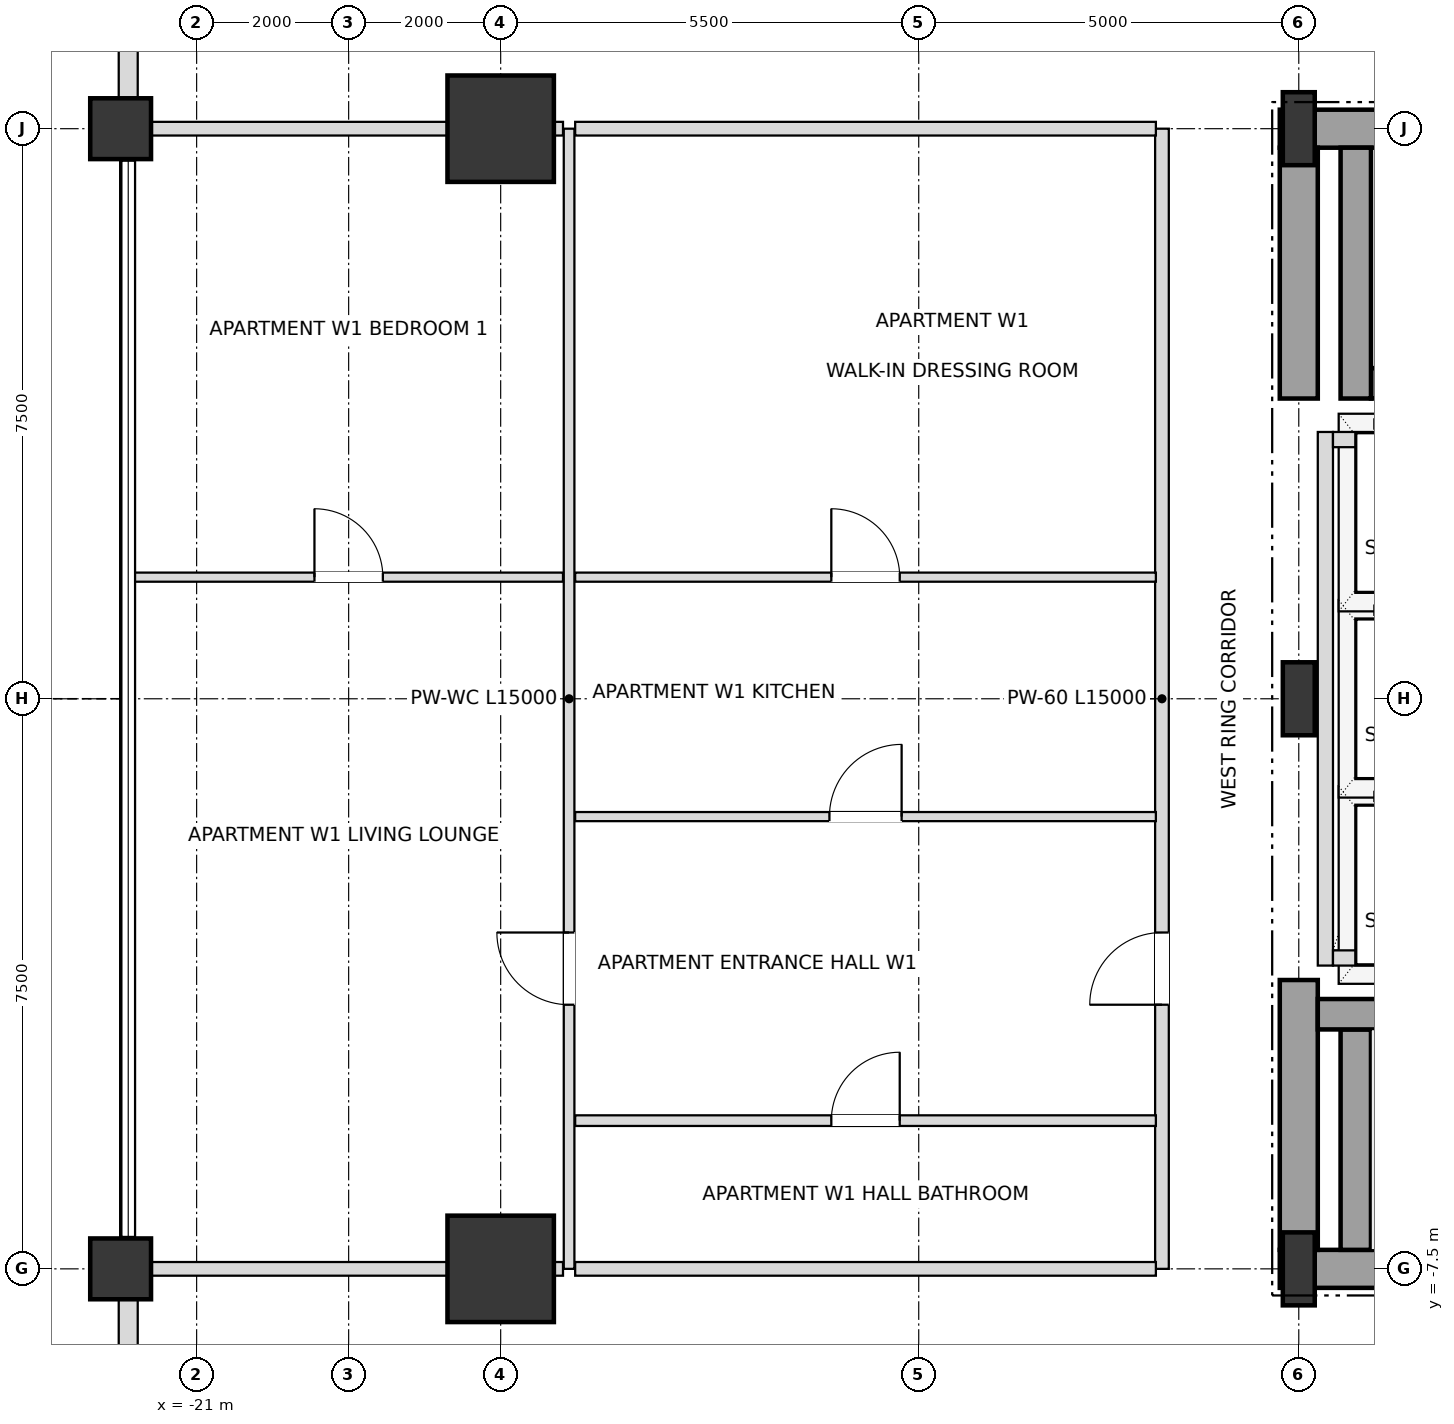
"""IFC4 building model, lengths in metres.
Left out: names, types, materials, properties, quantities, classifications, styles, units other than length and angle.
Written with IfcOpenShell. Run it as: python <this file> out.ifc"""

import sys

from ifc_helpers import new_model, si_unit, direction, frame, frame_2d, origin, origin_2d, place, context, subcontext, project, spatial, rectangle, i_section, extrude, element, fill, save


model = new_model("IFC4")
c1 = context("Model", 3, precision=1e-05, world=origin(), true_north=direction((0.0, 1.0)))
c2 = subcontext(c1, "Body", "Model", "MODEL_VIEW")
j1 = project(units=[si_unit("LENGTHUNIT", "METRE"), si_unit("PLANEANGLEUNIT", "RADIAN")], contexts=[c1])
p1 = place(None, origin())
s1 = spatial("IfcSite", under=j1, at=p1, CompositionType="ELEMENT")
p2 = place(p1, origin())
s2 = spatial("IfcBuilding", under=s1, at=p2, CompositionType="ELEMENT")
p3 = place(p2, frame((0.0, 0.0, 72.0)))
s3 = spatial("IfcBuildingStorey", under=s2, at=p3, CompositionType="ELEMENT", Elevation=72.0)
for number, where, z_axis, x_axis in (
    (1, (-6.5, -7.5, 0.0), (0.0, 0.0, 1.0), (1.0, 0.0, 0.0)),
    (2, (-6.5, 0.0, 0.0), (0.0, 0.0, 1.0), (1.0, 0.0, 0.0)),
    (3, (-6.5, 7.5, 0.0), (0.0, 0.0, 1.0), (1.0, 0.0, 0.0)),
):
    element("IfcColumn", number, at=place(p3, frame(where, z_axis=z_axis, x_axis=x_axis)), inside=s3, PredefinedType="COLUMN", context=c2, shape_type="SweptSolid", body=[
        extrude(i_section(OverallWidth=0.42, OverallDepth=0.96, WebThickness=0.022, FlangeThickness=0.034, at=origin_2d()), origin(), (0.0, 0.0, 1.0), 3.6),
    ])
for number, where, z_axis, x_axis in (
    (4, (-17.0, 7.5, 0.0), (0.0, 0.0, 1.0), (1.0, 0.0, 0.0)),
    (5, (-17.0, -7.5, 0.0), (0.0, 0.0, 1.0), (1.0, 0.0, 0.0)),
):
    element("IfcColumn", number, at=place(p3, frame(where, z_axis=z_axis, x_axis=x_axis)), inside=s3, PredefinedType="USERDEFINED", context=c2, shape_type="SweptSolid", body=[
        extrude(rectangle(XDim=1.4, YDim=1.4, at=origin_2d()), origin(), (0.0, 0.0, 1.0), 3.6),
    ])
for number, where, z_axis, x_axis in (
    (6, (-22.0, -7.5, 0.0), (0.0, 0.0, 1.0), (1.0, 0.0, 0.0)),
    (7, (-22.0, 7.5, 0.0), (0.0, 0.0, 1.0), (1.0, 0.0, 0.0)),
):
    element("IfcColumn", number, at=place(p3, frame(where, z_axis=z_axis, x_axis=x_axis)), inside=s3, PredefinedType="COLUMN", context=c2, shape_type="SweptSolid", body=[
        extrude(rectangle(XDim=0.8, YDim=0.8, at=origin_2d()), origin(), (0.0, 0.0, 1.0), 3.6),
    ])
p4 = place(p3, frame((-21.9, 12.605, 0.0), z_axis=(0.0, 0.0, 1.0), x_axis=(0.0, -1.0, 0.0)))
e8 = element("IfcWall", 8, at=p4, inside=s3, PredefinedType="SOLIDWALL", context=c2, shape_type="SweptSolid", body=[
    extrude(rectangle(XDim=4.71, YDim=0.25, at=frame_2d((2.355, 0.0))), origin(), (0.0, 0.0, 1.0), 2.736),
])
p5 = place(p4, frame((1.455, 0.0, 0.72)))
e9 = element("IfcOpeningElement", 9, at=p5, cuts=e8, PredefinedType="OPENING", context=c2, shape_type="SweptSolid", body=[
    extrude(rectangle(XDim=1.8, YDim=1.68, at=frame_2d((0.9, 0.84))), frame((0.0, 0.135, 0.0), z_axis=(0.0, -1.0, 0.0), x_axis=(1.0, 0.0, 0.0)), (0.0, 0.0, 1.0), 0.27),
])
p6 = place(p3, frame((-21.9, -7.895, 0.0), z_axis=(0.0, 0.0, 1.0), x_axis=(0.0, -1.0, 0.0)))
e10 = element("IfcWall", 10, at=p6, inside=s3, PredefinedType="SOLIDWALL", context=c2, shape_type="SweptSolid", body=[
    extrude(rectangle(XDim=4.71, YDim=0.25, at=frame_2d((2.355, 0.0))), origin(), (0.0, 0.0, 1.0), 2.736),
])
p7 = place(p6, frame((1.455, 0.0, 0.72)))
e11 = element("IfcOpeningElement", 11, at=p7, cuts=e10, PredefinedType="OPENING", context=c2, shape_type="SweptSolid", body=[
    extrude(rectangle(XDim=1.8, YDim=1.68, at=frame_2d((0.9, 0.84))), frame((0.0, 0.135, 0.0), z_axis=(0.0, -1.0, 0.0), x_axis=(1.0, 0.0, 0.0)), (0.0, 0.0, 1.0), 0.27),
])
p8 = place(p3, frame((-6.75, -7.5, 0.0), z_axis=(0.0, 0.0, 1.0), x_axis=(1.0, 0.0, 0.0)))
e12 = element("IfcWall", 12, at=p8, inside=s3, PredefinedType="SHEAR", context=c2, shape_type="SweptSolid", body=[
    extrude(rectangle(XDim=6.75, YDim=0.5, at=frame_2d((3.375, 0.0))), origin(), (0.0, 0.0, 1.0), 3.38),
])
p9 = place(p3, frame((-6.75, 7.5, 0.0), z_axis=(0.0, 0.0, 1.0), x_axis=(1.0, 0.0, 0.0)))
e13 = element("IfcWall", 13, at=p9, inside=s3, PredefinedType="SHEAR", context=c2, shape_type="SweptSolid", body=[
    extrude(rectangle(XDim=6.75, YDim=0.5, at=frame_2d((3.375, 0.0))), origin(), (0.0, 0.0, 1.0), 3.38),
])
p10 = place(p9, frame((1.65, 0.0, 0.0)))
e14 = element("IfcOpeningElement", 14, at=p10, cuts=e13, PredefinedType="OPENING", context=c2, shape_type="SweptSolid", body=[
    extrude(rectangle(XDim=1.05, YDim=2.15, at=frame_2d((0.525, 1.075))), frame((0.0, 0.26, 0.0), z_axis=(0.0, -1.0, 0.0), x_axis=(1.0, 0.0, 0.0)), (0.0, 0.0, 1.0), 0.52),
])
p11 = place(p3, frame((-6.5, -7.25, 0.0), z_axis=(0.0, 0.0, 1.0), x_axis=(0.0, 1.0, 0.0)))
e15 = element("IfcWall", 15, at=p11, inside=s3, PredefinedType="SHEAR", context=c2, shape_type="SweptSolid", body=[
    extrude(rectangle(XDim=3.55, YDim=0.5, at=frame_2d((1.775, 0.0))), origin(), (0.0, 0.0, 1.0), 3.38),
])
p12 = place(p3, frame((-6.5, 3.95, 0.0), z_axis=(0.0, 0.0, 1.0), x_axis=(0.0, 1.0, 0.0)))
e16 = element("IfcWall", 16, at=p12, inside=s3, PredefinedType="SHEAR", context=c2, shape_type="SweptSolid", body=[
    extrude(rectangle(XDim=3.3, YDim=0.5, at=frame_2d((1.65, 0.0))), origin(), (0.0, 0.0, 1.0), 3.38),
])
p13 = place(p3, frame((-5.75, -7.25, 0.0), z_axis=(0.0, 0.0, 1.0), x_axis=(0.0, 1.0, 0.0)))
e17 = element("IfcWall", 17, at=p13, inside=s3, PredefinedType="SHEAR", context=c2, shape_type="SweptSolid", body=[
    extrude(rectangle(XDim=2.9, YDim=0.4, at=frame_2d((1.45, 0.0))), origin(), (0.0, 0.0, 1.0), 3.38),
])
p14 = place(p3, frame((-6.25, -4.15, 0.0), z_axis=(0.0, 0.0, 1.0), x_axis=(1.0, 0.0, 0.0)))
e18 = element("IfcWall", 18, at=p14, inside=s3, PredefinedType="SHEAR", context=c2, shape_type="SweptSolid", body=[
    extrude(rectangle(XDim=7.78, YDim=0.4, at=frame_2d((3.89, 0.0))), origin(), (0.0, 0.0, 1.0), 3.38),
])
p15 = place(p3, frame((-5.55, 4.15, 0.0), z_axis=(0.0, 0.0, 1.0), x_axis=(1.0, 0.0, 0.0)))
e19 = element("IfcWall", 19, at=p15, inside=s3, PredefinedType="SHEAR", context=c2, shape_type="SweptSolid", body=[
    extrude(rectangle(XDim=7.08, YDim=0.4, at=frame_2d((3.54, 0.0))), origin(), (0.0, 0.0, 1.0), 3.38),
])
p16 = place(p3, frame((-5.75, 3.95, 0.0), z_axis=(0.0, 0.0, 1.0), x_axis=(0.0, 1.0, 0.0)))
e20 = element("IfcWall", 20, at=p16, inside=s3, PredefinedType="SHEAR", context=c2, shape_type="SweptSolid", body=[
    extrude(rectangle(XDim=3.3, YDim=0.4, at=frame_2d((1.65, 0.0))), origin(), (0.0, 0.0, 1.0), 3.38),
])
p17 = place(p3, frame((-6.15, -3.51, 0.0), z_axis=(0.0, 0.0, 1.0), x_axis=(0.0, 1.0, 0.0)))
e21 = element("IfcWall", 21, at=p17, inside=s3, PredefinedType="SOLIDWALL", context=c2, shape_type="SweptSolid", body=[
    extrude(rectangle(XDim=7.02, YDim=0.2, at=frame_2d((3.51, 0.0))), origin(), (0.0, 0.0, 1.0), 3.38),
])
for number, where, z_axis, x_axis in (
    (22, (-6.05, -3.41, 0.0), (0.0, 0.0, 1.0), (1.0, 0.0, 0.0)),
    (23, (-6.05, 3.41, 0.0), (0.0, 0.0, 1.0), (1.0, 0.0, 0.0)),
):
    element("IfcWall", number, at=place(p3, frame(where, z_axis=z_axis, x_axis=x_axis)), inside=s3, PredefinedType="SOLIDWALL", context=c2, shape_type="SweptSolid", body=[
        extrude(rectangle(XDim=2.2, YDim=0.2, at=frame_2d((1.1, 0.0))), origin(), (0.0, 0.0, 1.0), 3.38),
    ])
p18 = place(p3, frame((-16.1, -7.5, 0.0), z_axis=(0.0, 0.0, 1.0), x_axis=(0.0, 1.0, 0.0)))
e24 = element("IfcWall", 24, at=p18, inside=s3, PredefinedType="PARTITIONING", context=c2, shape_type="SweptSolid", body=[
    extrude(rectangle(XDim=15.0, YDim=0.14, at=frame_2d((7.5, 0.0))), origin(), (0.0, 0.0, 1.0), 3.38),
])
p19 = place(p18, frame((3.475, 0.0, 0.0)))
e25 = element("IfcOpeningElement", 25, at=p19, cuts=e24, PredefinedType="OPENING", context=c2, shape_type="SweptSolid", body=[
    extrude(rectangle(XDim=0.95, YDim=2.1, at=frame_2d((0.475, 1.05))), frame((0.0, 0.08, 0.0), z_axis=(0.0, -1.0, 0.0), x_axis=(1.0, 0.0, 0.0)), (0.0, 0.0, 1.0), 0.16),
])
p20 = place(p3, frame((-8.3, -7.5, 0.0), z_axis=(0.0, 0.0, 1.0), x_axis=(0.0, 1.0, 0.0)))
e26 = element("IfcWall", 26, at=p20, inside=s3, PredefinedType="PARTITIONING", context=c2, shape_type="SweptSolid", body=[
    extrude(rectangle(XDim=15.0, YDim=0.18, at=frame_2d((7.5, 0.0))), origin(), (0.0, 0.0, 1.0), 3.38),
])
p21 = place(p20, frame((3.475, 0.0, 0.0)))
e27 = element("IfcOpeningElement", 27, at=p21, cuts=e26, PredefinedType="OPENING", context=c2, shape_type="SweptSolid", body=[
    extrude(rectangle(XDim=0.95, YDim=2.15, at=frame_2d((0.475, 1.075))), frame((0.0, 0.1, 0.0), z_axis=(0.0, -1.0, 0.0), x_axis=(1.0, 0.0, 0.0)), (0.0, 0.0, 1.0), 0.2),
])
p22 = place(p3, frame((-21.9, -7.5, 0.0), z_axis=(0.0, 0.0, 1.0), x_axis=(1.0, 0.0, 0.0)))
e28 = element("IfcWall", 28, at=p22, inside=s3, PredefinedType="PARTITIONING", context=c2, shape_type="SweptSolid", body=[
    extrude(rectangle(XDim=5.72, YDim=0.18, at=frame_2d((2.86, 0.0))), origin(), (0.0, 0.0, 1.0), 2.816),
])
p23 = place(p3, frame((-16.02, -7.5, 0.0), z_axis=(0.0, 0.0, 1.0), x_axis=(1.0, 0.0, 0.0)))
e29 = element("IfcWall", 29, at=p23, inside=s3, PredefinedType="PARTITIONING", context=c2, shape_type="SweptSolid", body=[
    extrude(rectangle(XDim=7.64, YDim=0.18, at=frame_2d((3.82, 0.0))), origin(), (0.0, 0.0, 1.0), 2.816),
])
p24 = place(p3, frame((-16.02, -5.55, 0.0), z_axis=(0.0, 0.0, 1.0), x_axis=(1.0, 0.0, 0.0)))
e30 = element("IfcWall", 30, at=p24, inside=s3, PredefinedType="PARTITIONING", context=c2, shape_type="SweptSolid", body=[
    extrude(rectangle(XDim=7.64, YDim=0.14, at=frame_2d((3.82, 0.0))), origin(), (0.0, 0.0, 1.0), 2.948),
])
p25 = place(p24, frame((3.37, 0.0, 0.0)))
e31 = element("IfcOpeningElement", 31, at=p25, cuts=e30, PredefinedType="OPENING", context=c2, shape_type="SweptSolid", body=[
    extrude(rectangle(XDim=0.9, YDim=2.1, at=frame_2d((0.45, 1.05))), frame((0.0, 0.08, 0.0), z_axis=(0.0, -1.0, 0.0), x_axis=(1.0, 0.0, 0.0)), (0.0, 0.0, 1.0), 0.16),
])
p26 = place(p3, frame((-16.02, -1.55, 0.0), z_axis=(0.0, 0.0, 1.0), x_axis=(1.0, 0.0, 0.0)))
e32 = element("IfcWall", 32, at=p26, inside=s3, PredefinedType="PARTITIONING", context=c2, shape_type="SweptSolid", body=[
    extrude(rectangle(XDim=7.64, YDim=0.12, at=frame_2d((3.82, 0.0))), origin(), (0.0, 0.0, 1.0), 2.948),
])
p27 = place(p26, frame((3.345, 0.0, 0.0)))
e33 = element("IfcOpeningElement", 33, at=p27, cuts=e32, PredefinedType="OPENING", context=c2, shape_type="SweptSolid", body=[
    extrude(rectangle(XDim=0.95, YDim=2.1, at=frame_2d((0.475, 1.05))), frame((0.0, 0.07, 0.0), z_axis=(0.0, -1.0, 0.0), x_axis=(1.0, 0.0, 0.0)), (0.0, 0.0, 1.0), 0.14),
])
p28 = place(p3, frame((-21.82, 1.6, 0.0), z_axis=(0.0, 0.0, 1.0), x_axis=(1.0, 0.0, 0.0)))
e34 = element("IfcWall", 34, at=p28, inside=s3, PredefinedType="PARTITIONING", context=c2, shape_type="SweptSolid", body=[
    extrude(rectangle(XDim=5.64, YDim=0.12, at=frame_2d((2.82, 0.0))), origin(), (0.0, 0.0, 1.0), 2.816),
])
p29 = place(p28, frame((2.37, 0.0, 0.0)))
e35 = element("IfcOpeningElement", 35, at=p29, cuts=e34, PredefinedType="OPENING", context=c2, shape_type="SweptSolid", body=[
    extrude(rectangle(XDim=0.9, YDim=2.1, at=frame_2d((0.45, 1.05))), frame((0.0, 0.07, 0.0), z_axis=(0.0, -1.0, 0.0), x_axis=(1.0, 0.0, 0.0)), (0.0, 0.0, 1.0), 0.14),
])
p30 = place(p3, frame((-16.02, 1.6, 0.0), z_axis=(0.0, 0.0, 1.0), x_axis=(1.0, 0.0, 0.0)))
e36 = element("IfcWall", 36, at=p30, inside=s3, PredefinedType="PARTITIONING", context=c2, shape_type="SweptSolid", body=[
    extrude(rectangle(XDim=7.64, YDim=0.12, at=frame_2d((3.82, 0.0))), origin(), (0.0, 0.0, 1.0), 2.948),
])
p31 = place(p30, frame((3.37, 0.0, 0.0)))
e37 = element("IfcOpeningElement", 37, at=p31, cuts=e36, PredefinedType="OPENING", context=c2, shape_type="SweptSolid", body=[
    extrude(rectangle(XDim=0.9, YDim=2.1, at=frame_2d((0.45, 1.05))), frame((0.0, 0.07, 0.0), z_axis=(0.0, -1.0, 0.0), x_axis=(1.0, 0.0, 0.0)), (0.0, 0.0, 1.0), 0.14),
])
p32 = place(p3, frame((-21.9, 7.5, 0.0), z_axis=(0.0, 0.0, 1.0), x_axis=(1.0, 0.0, 0.0)))
e38 = element("IfcWall", 38, at=p32, inside=s3, PredefinedType="PARTITIONING", context=c2, shape_type="SweptSolid", body=[
    extrude(rectangle(XDim=5.72, YDim=0.18, at=frame_2d((2.86, 0.0))), origin(), (0.0, 0.0, 1.0), 2.816),
])
p33 = place(p3, frame((-16.02, 7.5, 0.0), z_axis=(0.0, 0.0, 1.0), x_axis=(1.0, 0.0, 0.0)))
e39 = element("IfcWall", 39, at=p33, inside=s3, PredefinedType="PARTITIONING", context=c2, shape_type="SweptSolid", body=[
    extrude(rectangle(XDim=7.64, YDim=0.18, at=frame_2d((3.82, 0.0))), origin(), (0.0, 0.0, 1.0), 2.816),
])
p34 = place(p25, origin())
e40 = element("IfcDoor", 40, at=p34, inside=s3, OperationType="SINGLE_SWING_RIGHT", PredefinedType="DOOR", context=c2, shape_type="SweptSolid", body=[
    extrude(rectangle(XDim=0.9, YDim=2.1, at=frame_2d((0.45, 1.05))), frame((0.0, 0.025, 0.0), z_axis=(0.0, -1.0, 0.0), x_axis=(1.0, 0.0, 0.0)), (0.0, 0.0, 1.0), 0.05),
])
fill(e31, e40)
p35 = place(p21, origin())
e41 = element("IfcDoor", 41, at=p35, inside=s3, OperationType="SINGLE_SWING_LEFT", PredefinedType="DOOR", context=c2, shape_type="SweptSolid", body=[
    extrude(rectangle(XDim=0.95, YDim=2.15, at=frame_2d((0.475, 1.075))), frame((0.0, 0.025, 0.0), z_axis=(0.0, -1.0, 0.0), x_axis=(1.0, 0.0, 0.0)), (0.0, 0.0, 1.0), 0.05),
])
fill(e27, e41)
p36 = place(p27, origin())
e42 = element("IfcDoor", 42, at=p36, inside=s3, OperationType="SINGLE_SWING_RIGHT", PredefinedType="DOOR", context=c2, shape_type="SweptSolid", body=[
    extrude(rectangle(XDim=0.95, YDim=2.1, at=frame_2d((0.475, 1.05))), frame((0.0, 0.025, 0.0), z_axis=(0.0, -1.0, 0.0), x_axis=(1.0, 0.0, 0.0)), (0.0, 0.0, 1.0), 0.05),
])
fill(e33, e42)
p37 = place(p31, origin())
e43 = element("IfcDoor", 43, at=p37, inside=s3, OperationType="SINGLE_SWING_LEFT", PredefinedType="DOOR", context=c2, shape_type="SweptSolid", body=[
    extrude(rectangle(XDim=0.9, YDim=2.1, at=frame_2d((0.45, 1.05))), frame((0.0, 0.025, 0.0), z_axis=(0.0, -1.0, 0.0), x_axis=(1.0, 0.0, 0.0)), (0.0, 0.0, 1.0), 0.05),
])
fill(e37, e43)
p38 = place(p19, origin())
e44 = element("IfcDoor", 44, at=p38, inside=s3, OperationType="SINGLE_SWING_RIGHT", PredefinedType="DOOR", context=c2, shape_type="SweptSolid", body=[
    extrude(rectangle(XDim=0.95, YDim=2.1, at=frame_2d((0.475, 1.05))), frame((0.0, 0.025, 0.0), z_axis=(0.0, -1.0, 0.0), x_axis=(1.0, 0.0, 0.0)), (0.0, 0.0, 1.0), 0.05),
])
fill(e25, e44)
p39 = place(p29, origin())
e45 = element("IfcDoor", 45, at=p39, inside=s3, OperationType="SINGLE_SWING_LEFT", PredefinedType="DOOR", context=c2, shape_type="SweptSolid", body=[
    extrude(rectangle(XDim=0.9, YDim=2.1, at=frame_2d((0.45, 1.05))), frame((0.0, 0.025, 0.0), z_axis=(0.0, -1.0, 0.0), x_axis=(1.0, 0.0, 0.0)), (0.0, 0.0, 1.0), 0.05),
])
fill(e35, e45)
save(model, sys.argv[1])
